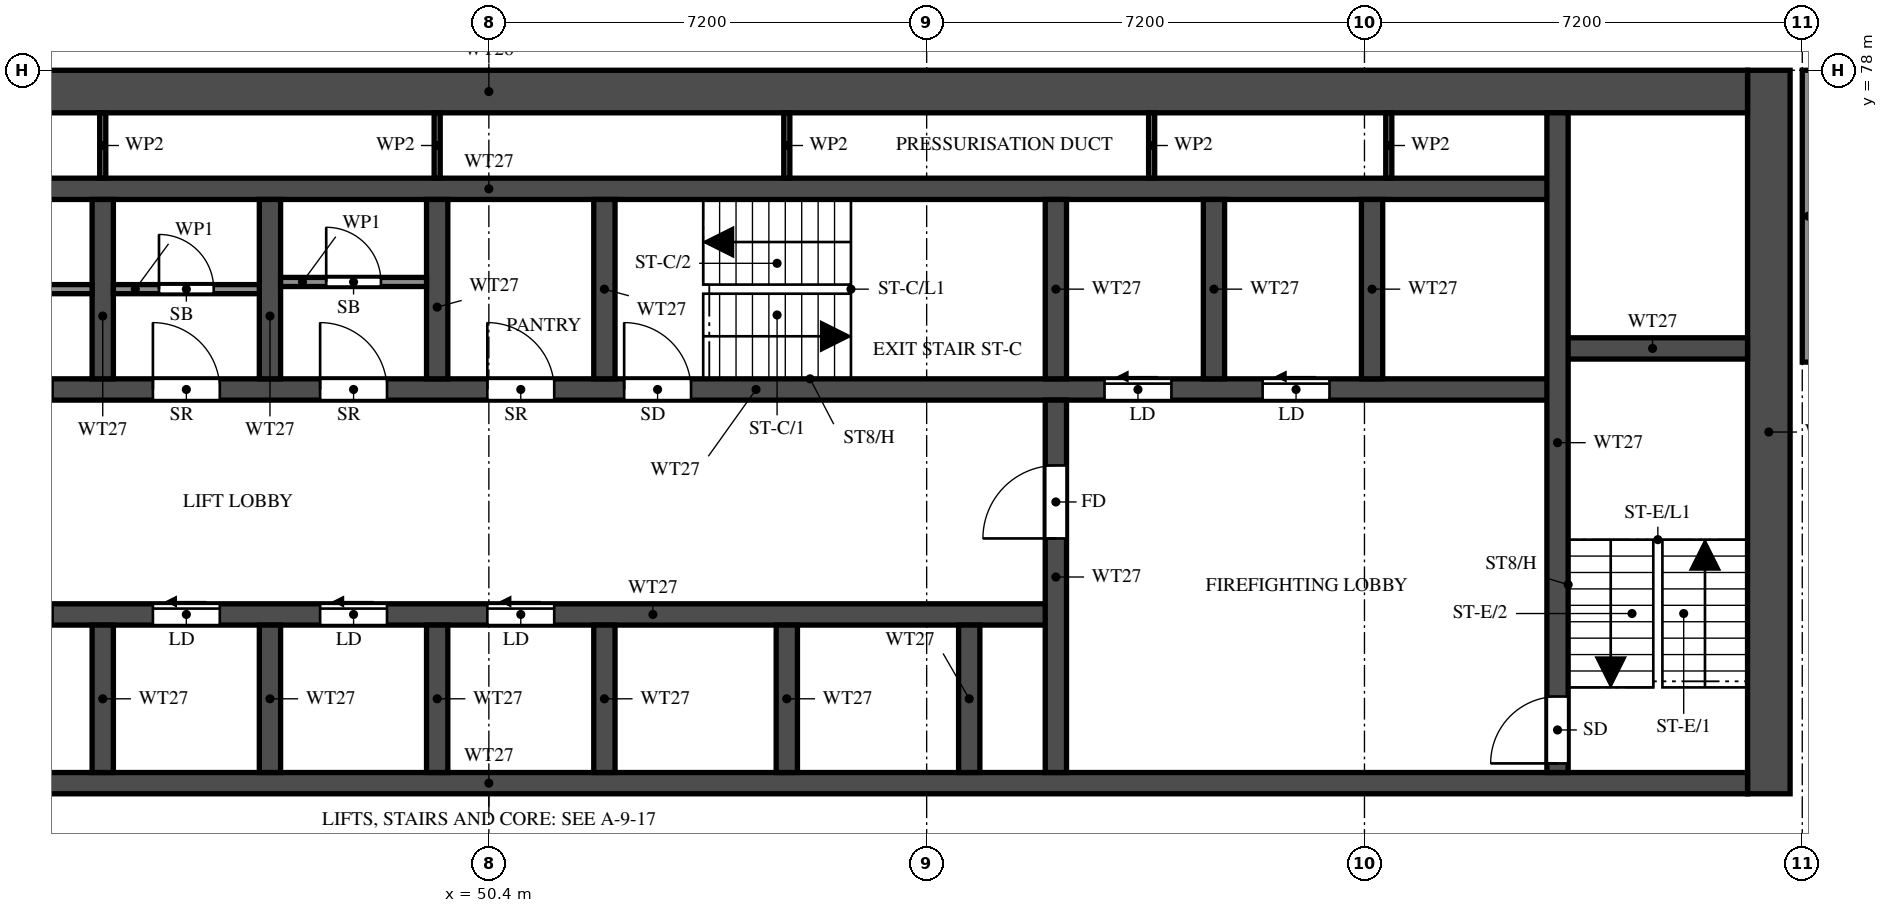
"""IFC4 building model, lengths in metres.
Left out: names, types, materials, properties, quantities, classifications, styles, units other than length and angle.
Written with IfcOpenShell. Run it as: python <this file> out.ifc"""

import sys

from ifc_helpers import new_model, si_unit, direction, frame, frame_2d, origin, place, context, subcontext, project, spatial, rectangle, extrude, element, fill, save


model = new_model("IFC4")
c1 = context("Model", 3, precision=1e-05, world=origin(), true_north=direction((0.0, 1.0)))
c2 = subcontext(c1, "Body", "Model", "MODEL_VIEW")
j1 = project(units=[si_unit("LENGTHUNIT", "METRE"), si_unit("PLANEANGLEUNIT", "RADIAN")], contexts=[c1])
p1 = place(None, origin())
s1 = spatial("IfcSite", under=j1, at=p1, CompositionType="ELEMENT")
p2 = place(p1, origin())
s2 = spatial("IfcBuilding", under=s1, at=p2, CompositionType="ELEMENT")
p3 = place(p2, frame((0.0, 0.0, 113.0)))
s3 = spatial("IfcBuildingStorey", under=s2, at=p3, CompositionType="ELEMENT", Elevation=113.0)
p4 = place(p3, frame((71.45, 66.1, 0.0), z_axis=(0.0, 0.0, 1.0), x_axis=(0.0, 1.0, 0.0)))
e1 = element("IfcWall", 1, at=p4, inside=s3, PredefinedType="SHEAR", context=c2, shape_type="SweptSolid", body=[
    extrude(rectangle(XDim=11.9, YDim=0.7, at=frame_2d((5.95, 0.0))), origin(), (0.0, 0.0, 1.0), 3.2),
])
p5 = place(p3, frame((29.7, 77.65, 0.0), z_axis=(0.0, 0.0, 1.0), x_axis=(1.0, 0.0, 0.0)))
e2 = element("IfcWall", 2, at=p5, inside=s3, PredefinedType="SHEAR", context=c2, shape_type="SweptSolid", body=[
    extrude(rectangle(XDim=41.4, YDim=0.7, at=frame_2d((20.7, 0.0))), origin(), (0.0, 0.0, 1.0), 3.2),
])
p6 = place(p3, frame((29.7, 66.275, 0.0), z_axis=(0.0, 0.0, 1.0), x_axis=(1.0, 0.0, 0.0)))
e3 = element("IfcWall", 3, at=p6, inside=s3, PredefinedType="SHEAR", context=c2, shape_type="SweptSolid", body=[
    extrude(rectangle(XDim=41.4, YDim=0.35, at=frame_2d((20.7, 0.0))), origin(), (0.0, 0.0, 1.0), 3.2),
])
p7 = place(p6, frame((0.925, 0.0, 0.0)))
e4 = element("IfcOpeningElement", 4, at=p7, cuts=e3, PredefinedType="OPENING", context=c2, shape_type="SweptSolid", body=[
    extrude(rectangle(XDim=1.1, YDim=2.1, at=frame_2d((0.55, 1.05))), frame((0.0, 0.185, 0.0), z_axis=(0.0, -1.0, 0.0), x_axis=(1.0, 0.0, 0.0)), (0.0, 0.0, 1.0), 0.37),
])
p8 = place(p6, frame((3.712, 0.0, 0.0)))
e5 = element("IfcOpeningElement", 5, at=p8, cuts=e3, PredefinedType="OPENING", context=c2, shape_type="SweptSolid", body=[
    extrude(rectangle(XDim=1.8, YDim=2.1, at=frame_2d((0.9, 1.05))), frame((0.0, 0.185, 0.0), z_axis=(0.0, -1.0, 0.0), x_axis=(1.0, 0.0, 0.0)), (0.0, 0.0, 1.0), 0.37),
])
p9 = place(p3, frame((35.625, 69.05, 0.0), z_axis=(0.0, 0.0, 1.0), x_axis=(1.0, 0.0, 0.0)))
e6 = element("IfcWall", 6, at=p9, inside=s3, PredefinedType="SHEAR", context=c2, shape_type="SweptSolid", body=[
    extrude(rectangle(XDim=24.1, YDim=0.35, at=frame_2d((12.05, 0.0))), origin(), (0.0, 0.0, 1.0), 3.2),
])
p10 = place(p9, frame((1.0, 0.0, 0.0)))
e7 = element("IfcOpeningElement", 7, at=p10, cuts=e6, PredefinedType="OPENING", context=c2, shape_type="SweptSolid", body=[
    extrude(rectangle(XDim=1.1, YDim=2.1, at=frame_2d((0.55, 1.05))), frame((0.0, 0.185, 0.0), z_axis=(0.0, -1.0, 0.0), x_axis=(1.0, 0.0, 0.0)), (0.0, 0.0, 1.0), 0.37),
])
p11 = place(p9, frame((3.75, 0.0, 0.0)))
e8 = element("IfcOpeningElement", 8, at=p11, cuts=e6, PredefinedType="OPENING", context=c2, shape_type="SweptSolid", body=[
    extrude(rectangle(XDim=1.1, YDim=2.1, at=frame_2d((0.55, 1.05))), frame((0.0, 0.185, 0.0), z_axis=(0.0, -1.0, 0.0), x_axis=(1.0, 0.0, 0.0)), (0.0, 0.0, 1.0), 0.37),
])
p12 = place(p9, frame((6.5, 0.0, 0.0)))
e9 = element("IfcOpeningElement", 9, at=p12, cuts=e6, PredefinedType="OPENING", context=c2, shape_type="SweptSolid", body=[
    extrude(rectangle(XDim=1.1, YDim=2.1, at=frame_2d((0.55, 1.05))), frame((0.0, 0.185, 0.0), z_axis=(0.0, -1.0, 0.0), x_axis=(1.0, 0.0, 0.0)), (0.0, 0.0, 1.0), 0.37),
])
p13 = place(p9, frame((9.25, 0.0, 0.0)))
e10 = element("IfcOpeningElement", 10, at=p13, cuts=e6, PredefinedType="OPENING", context=c2, shape_type="SweptSolid", body=[
    extrude(rectangle(XDim=1.1, YDim=2.1, at=frame_2d((0.55, 1.05))), frame((0.0, 0.185, 0.0), z_axis=(0.0, -1.0, 0.0), x_axis=(1.0, 0.0, 0.0)), (0.0, 0.0, 1.0), 0.37),
])
p14 = place(p9, frame((12.0, 0.0, 0.0)))
e11 = element("IfcOpeningElement", 11, at=p14, cuts=e6, PredefinedType="OPENING", context=c2, shape_type="SweptSolid", body=[
    extrude(rectangle(XDim=1.1, YDim=2.1, at=frame_2d((0.55, 1.05))), frame((0.0, 0.185, 0.0), z_axis=(0.0, -1.0, 0.0), x_axis=(1.0, 0.0, 0.0)), (0.0, 0.0, 1.0), 0.37),
])
p15 = place(p9, frame((14.75, 0.0, 0.0)))
e12 = element("IfcOpeningElement", 12, at=p15, cuts=e6, PredefinedType="OPENING", context=c2, shape_type="SweptSolid", body=[
    extrude(rectangle(XDim=1.1, YDim=2.1, at=frame_2d((0.55, 1.05))), frame((0.0, 0.185, 0.0), z_axis=(0.0, -1.0, 0.0), x_axis=(1.0, 0.0, 0.0)), (0.0, 0.0, 1.0), 0.37),
])
p16 = place(p3, frame((32.825, 72.75, 0.0), z_axis=(0.0, 0.0, 1.0), x_axis=(1.0, 0.0, 0.0)))
e13 = element("IfcWall", 13, at=p16, inside=s3, PredefinedType="SHEAR", context=c2, shape_type="SweptSolid", body=[
    extrude(rectangle(XDim=35.15, YDim=0.35, at=frame_2d((17.575, 0.0))), origin(), (0.0, 0.0, 1.0), 3.2),
])
p17 = place(p16, frame((19.8, 0.0, 0.0)))
e14 = element("IfcOpeningElement", 14, at=p17, cuts=e13, PredefinedType="OPENING", context=c2, shape_type="SweptSolid", body=[
    extrude(rectangle(XDim=1.1, YDim=2.1, at=frame_2d((0.55, 1.05))), frame((0.0, 0.185, 0.0), z_axis=(0.0, -1.0, 0.0), x_axis=(1.0, 0.0, 0.0)), (0.0, 0.0, 1.0), 0.37),
])
p18 = place(p16, frame((27.7, 0.0, 0.0)))
e15 = element("IfcOpeningElement", 15, at=p18, cuts=e13, PredefinedType="OPENING", context=c2, shape_type="SweptSolid", body=[
    extrude(rectangle(XDim=1.1, YDim=2.1, at=frame_2d((0.55, 1.05))), frame((0.0, 0.185, 0.0), z_axis=(0.0, -1.0, 0.0), x_axis=(1.0, 0.0, 0.0)), (0.0, 0.0, 1.0), 0.37),
])
p19 = place(p16, frame((30.3, 0.0, 0.0)))
e16 = element("IfcOpeningElement", 16, at=p19, cuts=e13, PredefinedType="OPENING", context=c2, shape_type="SweptSolid", body=[
    extrude(rectangle(XDim=1.1, YDim=2.1, at=frame_2d((0.55, 1.05))), frame((0.0, 0.185, 0.0), z_axis=(0.0, -1.0, 0.0), x_axis=(1.0, 0.0, 0.0)), (0.0, 0.0, 1.0), 0.37),
])
p20 = place(p16, frame((3.8, 0.0, 0.0)))
e17 = element("IfcOpeningElement", 17, at=p20, cuts=e13, PredefinedType="OPENING", context=c2, shape_type="SweptSolid", body=[
    extrude(rectangle(XDim=1.1, YDim=2.1, at=frame_2d((0.55, 1.05))), frame((0.0, 0.185, 0.0), z_axis=(0.0, -1.0, 0.0), x_axis=(1.0, 0.0, 0.0)), (0.0, 0.0, 1.0), 0.37),
])
p21 = place(p16, frame((6.55, 0.0, 0.0)))
e18 = element("IfcOpeningElement", 18, at=p21, cuts=e13, PredefinedType="OPENING", context=c2, shape_type="SweptSolid", body=[
    extrude(rectangle(XDim=1.1, YDim=2.1, at=frame_2d((0.55, 1.05))), frame((0.0, 0.185, 0.0), z_axis=(0.0, -1.0, 0.0), x_axis=(1.0, 0.0, 0.0)), (0.0, 0.0, 1.0), 0.37),
])
p22 = place(p16, frame((9.3, 0.0, 0.0)))
e19 = element("IfcOpeningElement", 19, at=p22, cuts=e13, PredefinedType="OPENING", context=c2, shape_type="SweptSolid", body=[
    extrude(rectangle(XDim=1.1, YDim=2.1, at=frame_2d((0.55, 1.05))), frame((0.0, 0.185, 0.0), z_axis=(0.0, -1.0, 0.0), x_axis=(1.0, 0.0, 0.0)), (0.0, 0.0, 1.0), 0.37),
])
p23 = place(p16, frame((12.05, 0.0, 0.0)))
e20 = element("IfcOpeningElement", 20, at=p23, cuts=e13, PredefinedType="OPENING", context=c2, shape_type="SweptSolid", body=[
    extrude(rectangle(XDim=1.1, YDim=2.1, at=frame_2d((0.55, 1.05))), frame((0.0, 0.185, 0.0), z_axis=(0.0, -1.0, 0.0), x_axis=(1.0, 0.0, 0.0)), (0.0, 0.0, 1.0), 0.37),
])
p24 = place(p16, frame((14.8, 0.0, 0.0)))
e21 = element("IfcOpeningElement", 21, at=p24, cuts=e13, PredefinedType="OPENING", context=c2, shape_type="SweptSolid", body=[
    extrude(rectangle(XDim=1.1, YDim=2.1, at=frame_2d((0.55, 1.05))), frame((0.0, 0.185, 0.0), z_axis=(0.0, -1.0, 0.0), x_axis=(1.0, 0.0, 0.0)), (0.0, 0.0, 1.0), 0.37),
])
p25 = place(p16, frame((17.55, 0.0, 0.0)))
e22 = element("IfcOpeningElement", 22, at=p25, cuts=e13, PredefinedType="OPENING", context=c2, shape_type="SweptSolid", body=[
    extrude(rectangle(XDim=1.1, YDim=2.1, at=frame_2d((0.55, 1.05))), frame((0.0, 0.185, 0.0), z_axis=(0.0, -1.0, 0.0), x_axis=(1.0, 0.0, 0.0)), (0.0, 0.0, 1.0), 0.37),
])
p26 = place(p16, frame((0.938, 0.0, 0.0)))
e23 = element("IfcOpeningElement", 23, at=p26, cuts=e13, PredefinedType="OPENING", context=c2, shape_type="SweptSolid", body=[
    extrude(rectangle(XDim=1.1, YDim=2.1, at=frame_2d((0.55, 1.05))), frame((0.0, 0.185, 0.0), z_axis=(0.0, -1.0, 0.0), x_axis=(1.0, 0.0, 0.0)), (0.0, 0.0, 1.0), 0.37),
])
p27 = place(p3, frame((32.825, 76.05, 0.0), z_axis=(0.0, 0.0, 1.0), x_axis=(1.0, 0.0, 0.0)))
e24 = element("IfcWall", 24, at=p27, inside=s3, PredefinedType="SHEAR", context=c2, shape_type="SweptSolid", body=[
    extrude(rectangle(XDim=35.15, YDim=0.35, at=frame_2d((17.575, 0.0))), origin(), (0.0, 0.0, 1.0), 3.2),
])
p28 = place(p3, frame((67.975, 73.425, 0.0), z_axis=(0.0, 0.0, 1.0), x_axis=(1.0, 0.0, 0.0)))
e25 = element("IfcWall", 25, at=p28, inside=s3, PredefinedType="SHEAR", context=c2, shape_type="SweptSolid", body=[
    extrude(rectangle(XDim=3.125, YDim=0.35, at=frame_2d((1.562, 0.0))), origin(), (0.0, 0.0, 1.0), 3.2),
])
p29 = place(p3, frame((67.975, 66.45, 0.0), z_axis=(0.0, 0.0, 1.0), x_axis=(0.0, 1.0, 0.0)))
e26 = element("IfcWall", 26, at=p29, inside=s3, PredefinedType="SHEAR", context=c2, shape_type="SweptSolid", body=[
    extrude(rectangle(XDim=10.85, YDim=0.35, at=frame_2d((5.425, 0.0))), origin(), (0.0, 0.0, 1.0), 3.2),
])
p30 = place(p29, frame((0.15, 0.0, 0.0)))
e27 = element("IfcOpeningElement", 27, at=p30, cuts=e26, PredefinedType="OPENING", context=c2, shape_type="SweptSolid", body=[
    extrude(rectangle(XDim=1.1, YDim=2.1, at=frame_2d((0.55, 1.05))), frame((0.0, 0.185, 0.0), z_axis=(0.0, -1.0, 0.0), x_axis=(1.0, 0.0, 0.0)), (0.0, 0.0, 1.0), 0.37),
])
p31 = place(p3, frame((59.725, 66.45, 0.0), z_axis=(0.0, 0.0, 1.0), x_axis=(0.0, 1.0, 0.0)))
e28 = element("IfcWall", 28, at=p31, inside=s3, PredefinedType="SHEAR", context=c2, shape_type="SweptSolid", body=[
    extrude(rectangle(XDim=6.125, YDim=0.35, at=frame_2d((3.062, 0.0))), origin(), (0.0, 0.0, 1.0), 3.2),
])
p32 = place(p31, frame((3.85, 0.0, 0.0)))
e29 = element("IfcOpeningElement", 29, at=p32, cuts=e28, PredefinedType="OPENING", context=c2, shape_type="SweptSolid", body=[
    extrude(rectangle(XDim=1.2, YDim=2.1, at=frame_2d((0.6, 1.05))), frame((0.0, 0.185, 0.0), z_axis=(0.0, -1.0, 0.0), x_axis=(1.0, 0.0, 0.0)), (0.0, 0.0, 1.0), 0.37),
])
p33 = place(p3, frame((59.725, 72.925, 0.0), z_axis=(0.0, 0.0, 1.0), x_axis=(0.0, 1.0, 0.0)))
e30 = element("IfcWall", 30, at=p33, inside=s3, PredefinedType="SHEAR", context=c2, shape_type="SweptSolid", body=[
    extrude(rectangle(XDim=2.95, YDim=0.35, at=frame_2d((1.475, 0.0))), origin(), (0.0, 0.0, 1.0), 3.2),
])
for number, where, z_axis, x_axis in (
    (31, (44.05, 66.45, 0.0), (0.0, 0.0, 1.0), (0.0, 1.0, 0.0)),
    (32, (46.8, 66.45, 0.0), (0.0, 0.0, 1.0), (0.0, 1.0, 0.0)),
    (33, (49.55, 66.45, 0.0), (0.0, 0.0, 1.0), (0.0, 1.0, 0.0)),
    (34, (52.3, 66.45, 0.0), (0.0, 0.0, 1.0), (0.0, 1.0, 0.0)),
    (35, (55.3, 66.45, 0.0), (0.0, 0.0, 1.0), (0.0, 1.0, 0.0)),
    (36, (58.3, 66.45, 0.0), (0.0, 0.0, 1.0), (0.0, 1.0, 0.0)),
):
    element("IfcWall", number, at=place(p3, frame(where, z_axis=z_axis, x_axis=x_axis)), inside=s3, PredefinedType="SHEAR", context=c2, shape_type="SweptSolid", body=[
        extrude(rectangle(XDim=2.425, YDim=0.35, at=frame_2d((1.212, 0.0))), origin(), (0.0, 0.0, 1.0), 3.2),
    ])
for number, where, z_axis, x_axis in (
    (37, (44.05, 72.925, 0.0), (0.0, 0.0, 1.0), (0.0, 1.0, 0.0)),
    (38, (46.8, 72.925, 0.0), (0.0, 0.0, 1.0), (0.0, 1.0, 0.0)),
    (39, (49.55, 72.925, 0.0), (0.0, 0.0, 1.0), (0.0, 1.0, 0.0)),
    (40, (52.3, 72.925, 0.0), (0.0, 0.0, 1.0), (0.0, 1.0, 0.0)),
    (41, (62.325, 72.925, 0.0), (0.0, 0.0, 1.0), (0.0, 1.0, 0.0)),
    (42, (64.925, 72.925, 0.0), (0.0, 0.0, 1.0), (0.0, 1.0, 0.0)),
):
    element("IfcWall", number, at=place(p3, frame(where, z_axis=z_axis, x_axis=x_axis)), inside=s3, PredefinedType="SHEAR", context=c2, shape_type="SweptSolid", body=[
        extrude(rectangle(XDim=2.95, YDim=0.35, at=frame_2d((1.475, 0.0))), origin(), (0.0, 0.0, 1.0), 3.2),
    ])
p34 = place(p3, frame((41.475, 74.4, 0.0), z_axis=(0.0, 0.0, 1.0), x_axis=(1.0, 0.0, 0.0)))
e43 = element("IfcWall", 43, at=p34, inside=s3, PredefinedType="PARTITIONING", context=c2, shape_type="SweptSolid", body=[
    extrude(rectangle(XDim=2.4, YDim=0.15, at=frame_2d((1.2, 0.0))), origin(), (0.0, 0.0, 1.0), 3.2),
])
p35 = place(p34, frame((0.75, 0.0, 0.0)))
e44 = element("IfcOpeningElement", 44, at=p35, cuts=e43, PredefinedType="OPENING", context=c2, shape_type="SweptSolid", body=[
    extrude(rectangle(XDim=0.9, YDim=2.1, at=frame_2d((0.45, 1.05))), frame((0.0, 0.085, 0.0), z_axis=(0.0, -1.0, 0.0), x_axis=(1.0, 0.0, 0.0)), (0.0, 0.0, 1.0), 0.17),
])
p36 = place(p3, frame((44.225, 74.4, 0.0), z_axis=(0.0, 0.0, 1.0), x_axis=(1.0, 0.0, 0.0)))
e45 = element("IfcWall", 45, at=p36, inside=s3, PredefinedType="PARTITIONING", context=c2, shape_type="SweptSolid", body=[
    extrude(rectangle(XDim=2.4, YDim=0.15, at=frame_2d((1.2, 0.0))), origin(), (0.0, 0.0, 1.0), 3.2),
])
p37 = place(p36, frame((0.75, 0.0, 0.0)))
e46 = element("IfcOpeningElement", 46, at=p37, cuts=e45, PredefinedType="OPENING", context=c2, shape_type="SweptSolid", body=[
    extrude(rectangle(XDim=0.9, YDim=2.1, at=frame_2d((0.45, 1.05))), frame((0.0, 0.085, 0.0), z_axis=(0.0, -1.0, 0.0), x_axis=(1.0, 0.0, 0.0)), (0.0, 0.0, 1.0), 0.17),
])
p38 = place(p3, frame((46.975, 74.518, 0.0), z_axis=(0.0, 0.0, 1.0), x_axis=(1.0, 0.0, 0.0)))
e47 = element("IfcWall", 47, at=p38, inside=s3, PredefinedType="PARTITIONING", context=c2, shape_type="SweptSolid", body=[
    extrude(rectangle(XDim=2.4, YDim=0.15, at=frame_2d((1.2, 0.0))), origin(), (0.0, 0.0, 1.0), 3.2),
])
p39 = place(p38, frame((0.75, 0.0, 0.0)))
e48 = element("IfcOpeningElement", 48, at=p39, cuts=e47, PredefinedType="OPENING", context=c2, shape_type="SweptSolid", body=[
    extrude(rectangle(XDim=0.9, YDim=2.1, at=frame_2d((0.45, 1.05))), frame((0.0, 0.085, 0.0), z_axis=(0.0, -1.0, 0.0), x_axis=(1.0, 0.0, 0.0)), (0.0, 0.0, 1.0), 0.17),
])
for number, where, z_axis, x_axis in (
    (49, (44.05, 76.225, 0.0), (0.0, 0.0, 1.0), (0.0, 1.0, 0.0)),
    (50, (49.55, 76.225, 0.0), (0.0, 0.0, 1.0), (0.0, 1.0, 0.0)),
    (51, (55.3, 76.225, 0.0), (0.0, 0.0, 1.0), (0.0, 1.0, 0.0)),
    (52, (61.3, 76.225, 0.0), (0.0, 0.0, 1.0), (0.0, 1.0, 0.0)),
    (53, (65.2, 76.225, 0.0), (0.0, 0.0, 1.0), (0.0, 1.0, 0.0)),
):
    element("IfcWall", number, at=place(p3, frame(where, z_axis=z_axis, x_axis=x_axis)), inside=s3, PredefinedType="PARTITIONING", context=c2, shape_type="SweptSolid", body=[
        extrude(rectangle(XDim=1.075, YDim=0.1, at=frame_2d((0.538, 0.0))), origin(), (0.0, 0.0, 1.0), 3.2),
    ])
p40 = place(p3, frame((72.1, 73.2, 0.0), z_axis=(0.0, 0.0, 1.0), x_axis=(0.0, 1.0, 0.0)))
e54 = element("IfcWall", 54, at=p40, inside=s3, PredefinedType="SOLIDWALL", context=c2, shape_type="SweptSolid", body=[
    extrude(rectangle(XDim=4.8, YDim=0.2, at=frame_2d((2.4, 0.0))), origin(), (0.0, 0.0, 1.0), 3.2),
])
p41 = place(p17, origin())
e55 = element("IfcDoor", 55, at=p41, inside=s3, OperationType="SINGLE_SWING_LEFT", PredefinedType="DOOR", context=c2, shape_type="SweptSolid", body=[
    extrude(rectangle(XDim=1.1, YDim=2.1, at=frame_2d((0.55, 1.05))), frame((0.0, 0.025, 0.0), z_axis=(0.0, -1.0, 0.0), x_axis=(1.0, 0.0, 0.0)), (0.0, 0.0, 1.0), 0.05),
])
fill(e14, e55)
p42 = place(p30, origin())
e56 = element("IfcDoor", 56, at=p42, inside=s3, OperationType="SINGLE_SWING_LEFT", PredefinedType="DOOR", context=c2, shape_type="SweptSolid", body=[
    extrude(rectangle(XDim=1.1, YDim=2.1, at=frame_2d((0.55, 1.05))), frame((0.0, 0.025, 0.0), z_axis=(0.0, -1.0, 0.0), x_axis=(1.0, 0.0, 0.0)), (0.0, 0.0, 1.0), 0.05),
])
fill(e27, e56)
p43 = place(p32, origin())
e57 = element("IfcDoor", 57, at=p43, inside=s3, OperationType="SINGLE_SWING_LEFT", PredefinedType="DOOR", context=c2, shape_type="SweptSolid", body=[
    extrude(rectangle(XDim=1.2, YDim=2.1, at=frame_2d((0.6, 1.05))), frame((0.0, 0.025, 0.0), z_axis=(0.0, -1.0, 0.0), x_axis=(1.0, 0.0, 0.0)), (0.0, 0.0, 1.0), 0.05),
])
fill(e29, e57)
p44 = place(p18, origin())
e58 = element("IfcDoor", 58, at=p44, inside=s3, OperationType="SLIDING_TO_LEFT", PredefinedType="DOOR", context=c2, shape_type="SweptSolid", body=[
    extrude(rectangle(XDim=1.1, YDim=2.1, at=frame_2d((0.55, 1.05))), frame((0.0, 0.025, 0.0), z_axis=(0.0, -1.0, 0.0), x_axis=(1.0, 0.0, 0.0)), (0.0, 0.0, 1.0), 0.05),
])
fill(e15, e58)
p45 = place(p19, origin())
e59 = element("IfcDoor", 59, at=p45, inside=s3, OperationType="SLIDING_TO_LEFT", PredefinedType="DOOR", context=c2, shape_type="SweptSolid", body=[
    extrude(rectangle(XDim=1.1, YDim=2.1, at=frame_2d((0.55, 1.05))), frame((0.0, 0.025, 0.0), z_axis=(0.0, -1.0, 0.0), x_axis=(1.0, 0.0, 0.0)), (0.0, 0.0, 1.0), 0.05),
])
fill(e16, e59)
p46 = place(p13, origin())
e60 = element("IfcDoor", 60, at=p46, inside=s3, OperationType="SLIDING_TO_LEFT", PredefinedType="DOOR", context=c2, shape_type="SweptSolid", body=[
    extrude(rectangle(XDim=1.1, YDim=2.1, at=frame_2d((0.55, 1.05))), frame((0.0, 0.025, 0.0), z_axis=(0.0, -1.0, 0.0), x_axis=(1.0, 0.0, 0.0)), (0.0, 0.0, 1.0), 0.05),
])
fill(e10, e60)
p47 = place(p14, origin())
e61 = element("IfcDoor", 61, at=p47, inside=s3, OperationType="SLIDING_TO_LEFT", PredefinedType="DOOR", context=c2, shape_type="SweptSolid", body=[
    extrude(rectangle(XDim=1.1, YDim=2.1, at=frame_2d((0.55, 1.05))), frame((0.0, 0.025, 0.0), z_axis=(0.0, -1.0, 0.0), x_axis=(1.0, 0.0, 0.0)), (0.0, 0.0, 1.0), 0.05),
])
fill(e11, e61)
p48 = place(p15, origin())
e62 = element("IfcDoor", 62, at=p48, inside=s3, OperationType="SLIDING_TO_LEFT", PredefinedType="DOOR", context=c2, shape_type="SweptSolid", body=[
    extrude(rectangle(XDim=1.1, YDim=2.1, at=frame_2d((0.55, 1.05))), frame((0.0, 0.025, 0.0), z_axis=(0.0, -1.0, 0.0), x_axis=(1.0, 0.0, 0.0)), (0.0, 0.0, 1.0), 0.05),
])
fill(e12, e62)
p49 = place(p23, origin())
e63 = element("IfcDoor", 63, at=p49, inside=s3, OperationType="SINGLE_SWING_RIGHT", PredefinedType="DOOR", context=c2, shape_type="SweptSolid", body=[
    extrude(rectangle(XDim=1.1, YDim=2.1, at=frame_2d((0.55, 1.05))), frame((0.0, 0.025, 0.0), z_axis=(0.0, -1.0, 0.0), x_axis=(1.0, 0.0, 0.0)), (0.0, 0.0, 1.0), 0.05),
])
fill(e20, e63)
p50 = place(p37, origin())
e64 = element("IfcDoor", 64, at=p50, inside=s3, OperationType="SINGLE_SWING_RIGHT", PredefinedType="DOOR", context=c2, shape_type="SweptSolid", body=[
    extrude(rectangle(XDim=0.9, YDim=2.1, at=frame_2d((0.45, 1.05))), frame((0.0, 0.025, 0.0), z_axis=(0.0, -1.0, 0.0), x_axis=(1.0, 0.0, 0.0)), (0.0, 0.0, 1.0), 0.05),
])
fill(e46, e64)
p51 = place(p24, origin())
e65 = element("IfcDoor", 65, at=p51, inside=s3, OperationType="SINGLE_SWING_LEFT", PredefinedType="DOOR", context=c2, shape_type="SweptSolid", body=[
    extrude(rectangle(XDim=1.1, YDim=2.1, at=frame_2d((0.55, 1.05))), frame((0.0, 0.025, 0.0), z_axis=(0.0, -1.0, 0.0), x_axis=(1.0, 0.0, 0.0)), (0.0, 0.0, 1.0), 0.05),
])
fill(e21, e65)
p52 = place(p39, origin())
e66 = element("IfcDoor", 66, at=p52, inside=s3, OperationType="SINGLE_SWING_RIGHT", PredefinedType="DOOR", context=c2, shape_type="SweptSolid", body=[
    extrude(rectangle(XDim=0.9, YDim=2.1, at=frame_2d((0.45, 1.05))), frame((0.0, 0.025, 0.0), z_axis=(0.0, -1.0, 0.0), x_axis=(1.0, 0.0, 0.0)), (0.0, 0.0, 1.0), 0.05),
])
fill(e48, e66)
p53 = place(p25, origin())
e67 = element("IfcDoor", 67, at=p53, inside=s3, OperationType="SINGLE_SWING_RIGHT", PredefinedType="DOOR", context=c2, shape_type="SweptSolid", body=[
    extrude(rectangle(XDim=1.1, YDim=2.1, at=frame_2d((0.55, 1.05))), frame((0.0, 0.025, 0.0), z_axis=(0.0, -1.0, 0.0), x_axis=(1.0, 0.0, 0.0)), (0.0, 0.0, 1.0), 0.05),
])
fill(e22, e67)
save(model, sys.argv[1])
